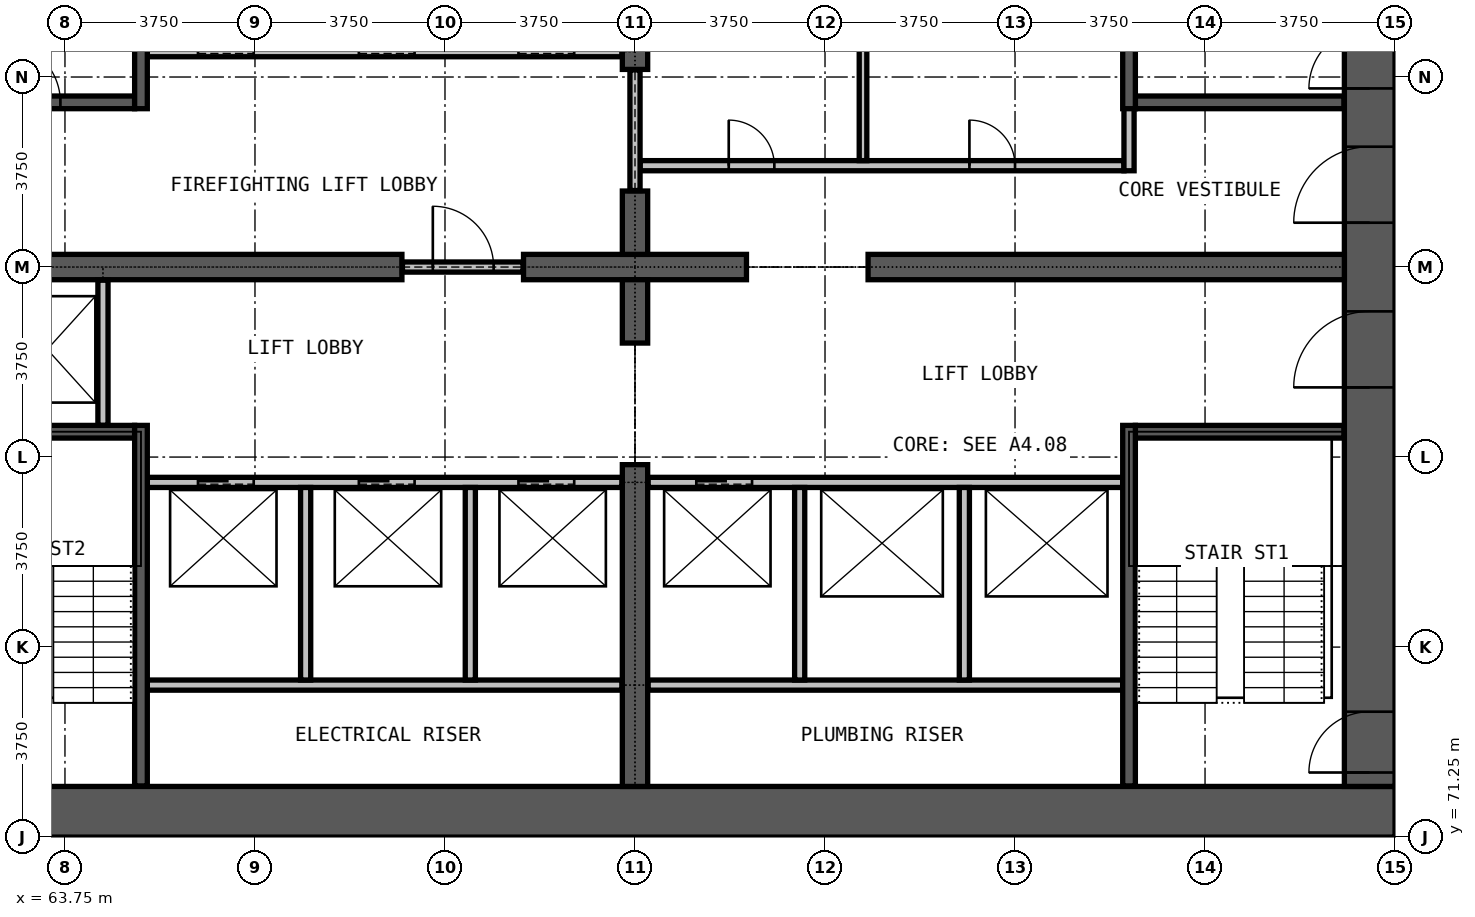
"""IFC4 building model, lengths in metres.
Left out: names, types, materials, properties, quantities, classifications, styles, units other than length and angle.
Written with IfcOpenShell. Run it as: python <this file> out.ifc"""

import sys

from ifc_helpers import new_model, si_unit, direction, frame, frame_2d, origin, place, context, subcontext, project, spatial, rectangle, extrude, element, fill, save


model = new_model("IFC4")
c1 = context("Model", 3, precision=1e-05, world=origin(), true_north=direction((0.0, 1.0)))
c2 = subcontext(c1, "Body", "Model", "MODEL_VIEW")
j1 = project(units=[si_unit("LENGTHUNIT", "METRE"), si_unit("PLANEANGLEUNIT", "RADIAN")], contexts=[c1])
p1 = place(None, origin())
s1 = spatial("IfcSite", under=j1, at=p1, CompositionType="ELEMENT")
p2 = place(p1, origin())
s2 = spatial("IfcBuilding", under=s1, at=p2, CompositionType="ELEMENT")
p3 = place(p2, frame((0.0, 0.0, 46.1)))
s3 = spatial("IfcBuildingStorey", under=s2, at=p3, CompositionType="ELEMENT", Elevation=46.1)
p4 = place(p3, frame((60.0, 71.75, 0.0), z_axis=(0.0, 0.0, 1.0), x_axis=(1.0, 0.0, 0.0)))
e1 = element("IfcWall", 1, at=p4, inside=s3, PredefinedType="SHEAR", context=c2, shape_type="SweptSolid", body=[
    extrude(rectangle(XDim=30.0, YDim=1.0, at=frame_2d((15.0, 0.0))), origin(), (0.0, 0.0, 1.0), 3.3),
])
p5 = place(p3, frame((89.5, 72.25, 0.0), z_axis=(0.0, 0.0, 1.0), x_axis=(0.0, 1.0, 0.0)))
e2 = element("IfcWall", 2, at=p5, inside=s3, PredefinedType="SHEAR", context=c2, shape_type="SweptSolid", body=[
    extrude(rectangle(XDim=20.5, YDim=1.0, at=frame_2d((10.25, 0.0))), origin(), (0.0, 0.0, 1.0), 3.3),
])
p6 = place(p5, frame((0.275, 0.0, 0.0)))
e3 = element("IfcOpeningElement", 3, at=p6, cuts=e2, PredefinedType="OPENING", context=c2, shape_type="SweptSolid", body=[
    extrude(rectangle(XDim=1.2, YDim=2.2, at=frame_2d((0.6, 1.1))), frame((0.0, 0.51, 0.0), z_axis=(0.0, -1.0, 0.0), x_axis=(1.0, 0.0, 0.0)), (0.0, 0.0, 1.0), 1.02),
])
p7 = place(p5, frame((13.775, 0.0, 0.0)))
e4 = element("IfcOpeningElement", 4, at=p7, cuts=e2, PredefinedType="OPENING", context=c2, shape_type="SweptSolid", body=[
    extrude(rectangle(XDim=1.2, YDim=2.2, at=frame_2d((0.6, 1.1))), frame((0.0, 0.51, 0.0), z_axis=(0.0, -1.0, 0.0), x_axis=(1.0, 0.0, 0.0)), (0.0, 0.0, 1.0), 1.02),
])
p8 = place(p5, frame((7.875, 0.0, 0.0)))
e5 = element("IfcOpeningElement", 5, at=p8, cuts=e2, PredefinedType="OPENING", context=c2, shape_type="SweptSolid", body=[
    extrude(rectangle(XDim=1.5, YDim=2.2, at=frame_2d((0.75, 1.1))), frame((0.0, 0.51, 0.0), z_axis=(0.0, -1.0, 0.0), x_axis=(1.0, 0.0, 0.0)), (0.0, 0.0, 1.0), 1.02),
])
p9 = place(p5, frame((11.125, 0.0, 0.0)))
e6 = element("IfcOpeningElement", 6, at=p9, cuts=e2, PredefinedType="OPENING", context=c2, shape_type="SweptSolid", body=[
    extrude(rectangle(XDim=1.5, YDim=2.2, at=frame_2d((0.75, 1.1))), frame((0.0, 0.51, 0.0), z_axis=(0.0, -1.0, 0.0), x_axis=(1.0, 0.0, 0.0)), (0.0, 0.0, 1.0), 1.02),
])
p10 = place(p3, frame((61.0, 82.5, 0.0), z_axis=(0.0, 0.0, 1.0), x_axis=(1.0, 0.0, 0.0)))
e7 = element("IfcWall", 7, at=p10, inside=s3, PredefinedType="SHEAR", context=c2, shape_type="SweptSolid", body=[
    extrude(rectangle(XDim=9.4, YDim=0.5, at=frame_2d((4.7, 0.0))), origin(), (0.0, 0.0, 1.0), 3.3),
])
p11 = place(p3, frame((72.8, 82.5, 0.0), z_axis=(0.0, 0.0, 1.0), x_axis=(1.0, 0.0, 0.0)))
e8 = element("IfcWall", 8, at=p11, inside=s3, PredefinedType="SHEAR", context=c2, shape_type="SweptSolid", body=[
    extrude(rectangle(XDim=4.4, YDim=0.5, at=frame_2d((2.2, 0.0))), origin(), (0.0, 0.0, 1.0), 3.3),
])
p12 = place(p3, frame((79.6, 82.5, 0.0), z_axis=(0.0, 0.0, 1.0), x_axis=(1.0, 0.0, 0.0)))
e9 = element("IfcWall", 9, at=p12, inside=s3, PredefinedType="SHEAR", context=c2, shape_type="SweptSolid", body=[
    extrude(rectangle(XDim=9.4, YDim=0.5, at=frame_2d((4.7, 0.0))), origin(), (0.0, 0.0, 1.0), 3.3),
])
p13 = place(p3, frame((75.0, 72.25, 0.0), z_axis=(0.0, 0.0, 1.0), x_axis=(0.0, 1.0, 0.0)))
e10 = element("IfcWall", 10, at=p13, inside=s3, PredefinedType="SHEAR", context=c2, shape_type="SweptSolid", body=[
    extrude(rectangle(XDim=6.35, YDim=0.5, at=frame_2d((3.175, 0.0))), origin(), (0.0, 0.0, 1.0), 3.3),
])
for number, where, z_axis, x_axis in (
    (11, (75.0, 81.0, 0.0), (0.0, 0.0, 1.0), (0.0, 1.0, 0.0)),
    (12, (75.0, 82.75, 0.0), (0.0, 0.0, 1.0), (0.0, 1.0, 0.0)),
):
    element("IfcWall", number, at=place(p3, frame(where, z_axis=z_axis, x_axis=x_axis)), inside=s3, PredefinedType="SHEAR", context=c2, shape_type="SweptSolid", body=[
        extrude(rectangle(XDim=1.25, YDim=0.5, at=frame_2d((0.625, 0.0))), origin(), (0.0, 0.0, 1.0), 3.3),
    ])
p14 = place(p3, frame((75.0, 86.4, 0.0), z_axis=(0.0, 0.0, 1.0), x_axis=(0.0, 1.0, 0.0)))
e13 = element("IfcWall", 13, at=p14, inside=s3, PredefinedType="SHEAR", context=c2, shape_type="SweptSolid", body=[
    extrude(rectangle(XDim=6.35, YDim=0.5, at=frame_2d((3.175, 0.0))), origin(), (0.0, 0.0, 1.0), 3.3),
])
p15 = place(p3, frame((70.41, 82.5, 0.0), z_axis=(0.0, 0.0, 1.0), x_axis=(1.0, 0.0, 0.0)))
e14 = element("IfcWall", 14, at=p15, inside=s3, PredefinedType="PARTITIONING", context=c2, shape_type="SweptSolid", body=[
    extrude(rectangle(XDim=2.38, YDim=0.2, at=frame_2d((1.19, 0.0))), origin(), (0.0, 0.0, 1.0), 2.4),
])
p16 = place(p15, frame((0.6, 0.0, 0.0)))
e15 = element("IfcOpeningElement", 15, at=p16, cuts=e14, PredefinedType="OPENING", context=c2, shape_type="SweptSolid", body=[
    extrude(rectangle(XDim=1.2, YDim=2.2, at=frame_2d((0.6, 1.1))), frame((0.0, 0.11, 0.0), z_axis=(0.0, -1.0, 0.0), x_axis=(1.0, 0.0, 0.0)), (0.0, 0.0, 1.0), 0.22),
])
p17 = place(p3, frame((75.1, 84.5, 0.0), z_axis=(0.0, 0.0, 1.0), x_axis=(1.0, 0.0, 0.0)))
e16 = element("IfcWall", 16, at=p17, inside=s3, PredefinedType="PARTITIONING", context=c2, shape_type="SweptSolid", body=[
    extrude(rectangle(XDim=9.55, YDim=0.2, at=frame_2d((4.775, 0.0))), origin(), (0.0, 0.0, 1.0), 3.0),
])
p18 = place(p17, frame((1.75, 0.0, 0.0)))
e17 = element("IfcOpeningElement", 17, at=p18, cuts=e16, PredefinedType="OPENING", context=c2, shape_type="SweptSolid", body=[
    extrude(rectangle(XDim=0.9, YDim=2.2, at=frame_2d((0.45, 1.1))), frame((0.0, 0.11, 0.0), z_axis=(0.0, -1.0, 0.0), x_axis=(1.0, 0.0, 0.0)), (0.0, 0.0, 1.0), 0.22),
])
p19 = place(p17, frame((6.5, 0.0, 0.0)))
e18 = element("IfcOpeningElement", 18, at=p19, cuts=e16, PredefinedType="OPENING", context=c2, shape_type="SweptSolid", body=[
    extrude(rectangle(XDim=0.9, YDim=2.2, at=frame_2d((0.45, 1.1))), frame((0.0, 0.11, 0.0), z_axis=(0.0, -1.0, 0.0), x_axis=(1.0, 0.0, 0.0)), (0.0, 0.0, 1.0), 0.22),
])
p20 = place(p3, frame((75.0, 84.01, 0.0), z_axis=(0.0, 0.0, 1.0), x_axis=(0.0, 1.0, 0.0)))
e19 = element("IfcWall", 19, at=p20, inside=s3, PredefinedType="PARTITIONING", context=c2, shape_type="SweptSolid", body=[
    extrude(rectangle(XDim=2.38, YDim=0.2, at=frame_2d((1.19, 0.0))), origin(), (0.0, 0.0, 1.0), 2.4),
])
p21 = place(p3, frame((84.75, 84.4, 0.0), z_axis=(0.0, 0.0, 1.0), x_axis=(0.0, 1.0, 0.0)))
e20 = element("IfcWall", 20, at=p21, inside=s3, PredefinedType="PARTITIONING", context=c2, shape_type="SweptSolid", body=[
    extrude(rectangle(XDim=1.475, YDim=0.2, at=frame_2d((0.738, 0.0))), origin(), (0.0, 0.0, 1.0), 3.0),
])
p22 = place(p3, frame((79.5, 84.6, 0.0), z_axis=(0.0, 0.0, 1.0), x_axis=(0.0, 1.0, 0.0)))
e21 = element("IfcWall", 21, at=p22, inside=s3, PredefinedType="PARTITIONING", context=c2, shape_type="SweptSolid", body=[
    extrude(rectangle(XDim=6.05, YDim=0.15, at=frame_2d((3.025, 0.0))), origin(), (0.0, 0.0, 1.0), 3.0),
])
for number, where, z_axis, x_axis in (
    (22, (65.375, 74.25, 0.0), (0.0, 0.0, 1.0), (1.0, 0.0, 0.0)),
    (23, (75.26, 74.25, 0.0), (0.0, 0.0, 1.0), (1.0, 0.0, 0.0)),
):
    element("IfcWall", number, at=place(p3, frame(where, z_axis=z_axis, x_axis=x_axis)), inside=s3, PredefinedType="PARTITIONING", context=c2, shape_type="SweptSolid", body=[
        extrude(rectangle(XDim=9.365, YDim=0.2, at=frame_2d((4.683, 0.0))), origin(), (0.0, 0.0, 1.0), 3.0),
    ])
p23 = place(p3, frame((65.375, 78.25, 0.0), z_axis=(0.0, 0.0, 1.0), x_axis=(1.0, 0.0, 0.0)))
e24 = element("IfcWall", 24, at=p23, inside=s3, PredefinedType="PARTITIONING", context=c2, shape_type="SweptSolid", body=[
    extrude(rectangle(XDim=9.365, YDim=0.2, at=frame_2d((4.683, 0.0))), origin(), (0.0, 0.0, 1.0), 3.0),
])
p24 = place(p23, frame((1.0, 0.0, 0.0)))
e25 = element("IfcOpeningElement", 25, at=p24, cuts=e24, PredefinedType="OPENING", context=c2, shape_type="SweptSolid", body=[
    extrude(rectangle(XDim=1.1, YDim=2.2, at=frame_2d((0.55, 1.1))), frame((0.0, 0.11, 0.0), z_axis=(0.0, -1.0, 0.0), x_axis=(1.0, 0.0, 0.0)), (0.0, 0.0, 1.0), 0.22),
])
p25 = place(p23, frame((4.175, 0.0, 0.0)))
e26 = element("IfcOpeningElement", 26, at=p25, cuts=e24, PredefinedType="OPENING", context=c2, shape_type="SweptSolid", body=[
    extrude(rectangle(XDim=1.1, YDim=2.2, at=frame_2d((0.55, 1.1))), frame((0.0, 0.11, 0.0), z_axis=(0.0, -1.0, 0.0), x_axis=(1.0, 0.0, 0.0)), (0.0, 0.0, 1.0), 0.22),
])
p26 = place(p23, frame((7.325, 0.0, 0.0)))
e27 = element("IfcOpeningElement", 27, at=p26, cuts=e24, PredefinedType="OPENING", context=c2, shape_type="SweptSolid", body=[
    extrude(rectangle(XDim=1.1, YDim=2.2, at=frame_2d((0.55, 1.1))), frame((0.0, 0.11, 0.0), z_axis=(0.0, -1.0, 0.0), x_axis=(1.0, 0.0, 0.0)), (0.0, 0.0, 1.0), 0.22),
])
p27 = place(p3, frame((75.26, 78.25, 0.0), z_axis=(0.0, 0.0, 1.0), x_axis=(1.0, 0.0, 0.0)))
e28 = element("IfcWall", 28, at=p27, inside=s3, PredefinedType="PARTITIONING", context=c2, shape_type="SweptSolid", body=[
    extrude(rectangle(XDim=9.365, YDim=0.2, at=frame_2d((4.683, 0.0))), origin(), (0.0, 0.0, 1.0), 3.0),
])
p28 = place(p27, frame((0.95, 0.0, 0.0)))
e29 = element("IfcOpeningElement", 29, at=p28, cuts=e28, PredefinedType="OPENING", context=c2, shape_type="SweptSolid", body=[
    extrude(rectangle(XDim=1.1, YDim=2.2, at=frame_2d((0.55, 1.1))), frame((0.0, 0.11, 0.0), z_axis=(0.0, -1.0, 0.0), x_axis=(1.0, 0.0, 0.0)), (0.0, 0.0, 1.0), 0.22),
])
p29 = place(p3, frame((65.375, 86.75, 0.0), z_axis=(0.0, 0.0, 1.0), x_axis=(1.0, 0.0, 0.0)))
e30 = element("IfcWall", 30, at=p29, inside=s3, PredefinedType="PARTITIONING", context=c2, shape_type="SweptSolid", body=[
    extrude(rectangle(XDim=9.365, YDim=0.2, at=frame_2d((4.683, 0.0))), origin(), (0.0, 0.0, 1.0), 3.0),
])
p30 = place(p29, frame((1.0, 0.0, 0.0)))
e31 = element("IfcOpeningElement", 31, at=p30, cuts=e30, PredefinedType="OPENING", context=c2, shape_type="SweptSolid", body=[
    extrude(rectangle(XDim=1.1, YDim=2.2, at=frame_2d((0.55, 1.1))), frame((0.0, 0.11, 0.0), z_axis=(0.0, -1.0, 0.0), x_axis=(1.0, 0.0, 0.0)), (0.0, 0.0, 1.0), 0.22),
])
p31 = place(p29, frame((4.175, 0.0, 0.0)))
e32 = element("IfcOpeningElement", 32, at=p31, cuts=e30, PredefinedType="OPENING", context=c2, shape_type="SweptSolid", body=[
    extrude(rectangle(XDim=1.1, YDim=2.2, at=frame_2d((0.55, 1.1))), frame((0.0, 0.11, 0.0), z_axis=(0.0, -1.0, 0.0), x_axis=(1.0, 0.0, 0.0)), (0.0, 0.0, 1.0), 0.22),
])
p32 = place(p29, frame((7.325, 0.0, 0.0)))
e33 = element("IfcOpeningElement", 33, at=p32, cuts=e30, PredefinedType="OPENING", context=c2, shape_type="SweptSolid", body=[
    extrude(rectangle(XDim=1.1, YDim=2.2, at=frame_2d((0.55, 1.1))), frame((0.0, 0.11, 0.0), z_axis=(0.0, -1.0, 0.0), x_axis=(1.0, 0.0, 0.0)), (0.0, 0.0, 1.0), 0.22),
])
p33 = place(p3, frame((64.5, 79.375, 0.0), z_axis=(0.0, 0.0, 1.0), x_axis=(0.0, 1.0, 0.0)))
e34 = element("IfcWall", 34, at=p33, inside=s3, PredefinedType="PARTITIONING", context=c2, shape_type="SweptSolid", body=[
    extrude(rectangle(XDim=2.865, YDim=0.2, at=frame_2d((1.433, 0.0))), origin(), (0.0, 0.0, 1.0), 3.0),
])
for number, where, z_axis, x_axis in (
    (35, (68.5, 74.35, 0.0), (0.0, 0.0, 1.0), (0.0, 1.0, 0.0)),
    (36, (71.75, 74.35, 0.0), (0.0, 0.0, 1.0), (0.0, 1.0, 0.0)),
    (37, (78.25, 74.35, 0.0), (0.0, 0.0, 1.0), (0.0, 1.0, 0.0)),
    (38, (81.5, 74.35, 0.0), (0.0, 0.0, 1.0), (0.0, 1.0, 0.0)),
):
    element("IfcWall", number, at=place(p3, frame(where, z_axis=z_axis, x_axis=x_axis)), inside=s3, PredefinedType="PARTITIONING", context=c2, shape_type="SweptSolid", body=[
        extrude(rectangle(XDim=3.8, YDim=0.2, at=frame_2d((1.9, 0.0))), origin(), (0.0, 0.0, 1.0), 3.0),
    ])
for number, where, z_axis, x_axis in (
    (39, (61.01, 79.25, 0.0), (0.0, 0.0, 1.0), (1.0, 0.0, 0.0)),
    (40, (84.875, 79.25, 0.0), (0.0, 0.0, 1.0), (1.0, 0.0, 0.0)),
):
    element("IfcWall", number, at=place(p3, frame(where, z_axis=z_axis, x_axis=x_axis)), inside=s3, PredefinedType="PARTITIONING", context=c2, shape_type="SweptSolid", body=[
        extrude(rectangle(XDim=4.115, YDim=0.25, at=frame_2d((2.058, 0.0))), origin(), (0.0, 0.0, 1.0), 3.0),
    ])
p34 = place(p3, frame((61.01, 85.75, 0.0), z_axis=(0.0, 0.0, 1.0), x_axis=(1.0, 0.0, 0.0)))
e41 = element("IfcWall", 41, at=p34, inside=s3, PredefinedType="PARTITIONING", context=c2, shape_type="SweptSolid", body=[
    extrude(rectangle(XDim=4.115, YDim=0.25, at=frame_2d((2.058, 0.0))), origin(), (0.0, 0.0, 1.0), 3.0),
])
p35 = place(p34, frame((1.45, 0.0, 0.0)))
e42 = element("IfcOpeningElement", 42, at=p35, cuts=e41, PredefinedType="OPENING", context=c2, shape_type="SweptSolid", body=[
    extrude(rectangle(XDim=1.2, YDim=2.2, at=frame_2d((0.6, 1.1))), frame((0.0, 0.135, 0.0), z_axis=(0.0, -1.0, 0.0), x_axis=(1.0, 0.0, 0.0)), (0.0, 0.0, 1.0), 0.27),
])
p36 = place(p3, frame((84.875, 85.75, 0.0), z_axis=(0.0, 0.0, 1.0), x_axis=(1.0, 0.0, 0.0)))
e43 = element("IfcWall", 43, at=p36, inside=s3, PredefinedType="PARTITIONING", context=c2, shape_type="SweptSolid", body=[
    extrude(rectangle(XDim=4.115, YDim=0.25, at=frame_2d((2.058, 0.0))), origin(), (0.0, 0.0, 1.0), 3.0),
])
for number, where, z_axis, x_axis in (
    (44, (65.25, 72.26, 0.0), (0.0, 0.0, 1.0), (0.0, 1.0, 0.0)),
    (45, (65.25, 85.625, 0.0), (0.0, 0.0, 1.0), (0.0, 1.0, 0.0)),
    (46, (84.75, 72.26, 0.0), (0.0, 0.0, 1.0), (0.0, 1.0, 0.0)),
    (47, (84.75, 85.625, 0.0), (0.0, 0.0, 1.0), (0.0, 1.0, 0.0)),
):
    element("IfcWall", number, at=place(p3, frame(where, z_axis=z_axis, x_axis=x_axis)), inside=s3, PredefinedType="PARTITIONING", context=c2, shape_type="SweptSolid", body=[
        extrude(rectangle(XDim=7.115, YDim=0.25, at=frame_2d((3.558, 0.0))), origin(), (0.0, 0.0, 1.0), 3.0),
    ])
p37 = place(p24, origin())
e48 = element("IfcDoor", 48, at=p37, inside=s3, OperationType="DOUBLE_DOOR_SLIDING", PredefinedType="DOOR", context=c2, shape_type="SweptSolid", body=[
    extrude(rectangle(XDim=1.1, YDim=2.2, at=frame_2d((0.55, 1.1))), frame((0.0, 0.025, 0.0), z_axis=(0.0, -1.0, 0.0), x_axis=(1.0, 0.0, 0.0)), (0.0, 0.0, 1.0), 0.05),
])
fill(e25, e48)
p38 = place(p25, origin())
e49 = element("IfcDoor", 49, at=p38, inside=s3, OperationType="DOUBLE_DOOR_SLIDING", PredefinedType="DOOR", context=c2, shape_type="SweptSolid", body=[
    extrude(rectangle(XDim=1.1, YDim=2.2, at=frame_2d((0.55, 1.1))), frame((0.0, 0.025, 0.0), z_axis=(0.0, -1.0, 0.0), x_axis=(1.0, 0.0, 0.0)), (0.0, 0.0, 1.0), 0.05),
])
fill(e26, e49)
p39 = place(p26, origin())
e50 = element("IfcDoor", 50, at=p39, inside=s3, OperationType="DOUBLE_DOOR_SLIDING", PredefinedType="DOOR", context=c2, shape_type="SweptSolid", body=[
    extrude(rectangle(XDim=1.1, YDim=2.2, at=frame_2d((0.55, 1.1))), frame((0.0, 0.025, 0.0), z_axis=(0.0, -1.0, 0.0), x_axis=(1.0, 0.0, 0.0)), (0.0, 0.0, 1.0), 0.05),
])
fill(e27, e50)
p40 = place(p28, origin())
e51 = element("IfcDoor", 51, at=p40, inside=s3, OperationType="DOUBLE_DOOR_SLIDING", PredefinedType="DOOR", context=c2, shape_type="SweptSolid", body=[
    extrude(rectangle(XDim=1.1, YDim=2.2, at=frame_2d((0.55, 1.1))), frame((0.0, 0.025, 0.0), z_axis=(0.0, -1.0, 0.0), x_axis=(1.0, 0.0, 0.0)), (0.0, 0.0, 1.0), 0.05),
])
fill(e29, e51)
p41 = place(p30, origin())
e52 = element("IfcDoor", 52, at=p41, inside=s3, OperationType="DOUBLE_DOOR_SLIDING", PredefinedType="DOOR", context=c2, shape_type="SweptSolid", body=[
    extrude(rectangle(XDim=1.1, YDim=2.2, at=frame_2d((0.55, 1.1))), frame((0.0, 0.025, 0.0), z_axis=(0.0, -1.0, 0.0), x_axis=(1.0, 0.0, 0.0)), (0.0, 0.0, 1.0), 0.05),
])
fill(e31, e52)
p42 = place(p31, origin())
e53 = element("IfcDoor", 53, at=p42, inside=s3, OperationType="DOUBLE_DOOR_SLIDING", PredefinedType="DOOR", context=c2, shape_type="SweptSolid", body=[
    extrude(rectangle(XDim=1.1, YDim=2.2, at=frame_2d((0.55, 1.1))), frame((0.0, 0.025, 0.0), z_axis=(0.0, -1.0, 0.0), x_axis=(1.0, 0.0, 0.0)), (0.0, 0.0, 1.0), 0.05),
])
fill(e32, e53)
p43 = place(p32, origin())
e54 = element("IfcDoor", 54, at=p43, inside=s3, OperationType="DOUBLE_DOOR_SLIDING", PredefinedType="DOOR", context=c2, shape_type="SweptSolid", body=[
    extrude(rectangle(XDim=1.1, YDim=2.2, at=frame_2d((0.55, 1.1))), frame((0.0, 0.025, 0.0), z_axis=(0.0, -1.0, 0.0), x_axis=(1.0, 0.0, 0.0)), (0.0, 0.0, 1.0), 0.05),
])
fill(e33, e54)
p44 = place(p16, origin())
e55 = element("IfcDoor", 55, at=p44, inside=s3, OperationType="SINGLE_SWING_LEFT", PredefinedType="DOOR", context=c2, shape_type="SweptSolid", body=[
    extrude(rectangle(XDim=1.2, YDim=2.2, at=frame_2d((0.6, 1.1))), frame((0.0, 0.025, 0.0), z_axis=(0.0, -1.0, 0.0), x_axis=(1.0, 0.0, 0.0)), (0.0, 0.0, 1.0), 0.05),
])
fill(e15, e55)
p45 = place(p35, origin())
e56 = element("IfcDoor", 56, at=p45, inside=s3, OperationType="SINGLE_SWING_LEFT", PredefinedType="DOOR", context=c2, shape_type="SweptSolid", body=[
    extrude(rectangle(XDim=1.2, YDim=2.2, at=frame_2d((0.6, 1.1))), frame((0.0, 0.025, 0.0), z_axis=(0.0, -1.0, 0.0), x_axis=(1.0, 0.0, 0.0)), (0.0, 0.0, 1.0), 0.05),
])
fill(e42, e56)
p46 = place(p6, origin())
e57 = element("IfcDoor", 57, at=p46, inside=s3, OperationType="SINGLE_SWING_RIGHT", PredefinedType="DOOR", context=c2, shape_type="SweptSolid", body=[
    extrude(rectangle(XDim=1.2, YDim=2.2, at=frame_2d((0.6, 1.1))), frame((0.0, 0.025, 0.0), z_axis=(0.0, -1.0, 0.0), x_axis=(1.0, 0.0, 0.0)), (0.0, 0.0, 1.0), 0.05),
])
fill(e3, e57)
p47 = place(p7, origin())
e58 = element("IfcDoor", 58, at=p47, inside=s3, OperationType="SINGLE_SWING_LEFT", PredefinedType="DOOR", context=c2, shape_type="SweptSolid", body=[
    extrude(rectangle(XDim=1.2, YDim=2.2, at=frame_2d((0.6, 1.1))), frame((0.0, 0.025, 0.0), z_axis=(0.0, -1.0, 0.0), x_axis=(1.0, 0.0, 0.0)), (0.0, 0.0, 1.0), 0.05),
])
fill(e4, e58)
p48 = place(p8, origin())
e59 = element("IfcDoor", 59, at=p48, inside=s3, OperationType="DOUBLE_DOOR_SINGLE_SWING", PredefinedType="DOOR", context=c2, shape_type="SweptSolid", body=[
    extrude(rectangle(XDim=1.5, YDim=2.2, at=frame_2d((0.75, 1.1))), frame((0.0, 0.025, 0.0), z_axis=(0.0, -1.0, 0.0), x_axis=(1.0, 0.0, 0.0)), (0.0, 0.0, 1.0), 0.05),
])
fill(e5, e59)
p49 = place(p9, origin())
e60 = element("IfcDoor", 60, at=p49, inside=s3, OperationType="DOUBLE_DOOR_SINGLE_SWING", PredefinedType="DOOR", context=c2, shape_type="SweptSolid", body=[
    extrude(rectangle(XDim=1.5, YDim=2.2, at=frame_2d((0.75, 1.1))), frame((0.0, 0.025, 0.0), z_axis=(0.0, -1.0, 0.0), x_axis=(1.0, 0.0, 0.0)), (0.0, 0.0, 1.0), 0.05),
])
fill(e6, e60)
p50 = place(p18, origin())
e61 = element("IfcDoor", 61, at=p50, inside=s3, OperationType="SINGLE_SWING_LEFT", PredefinedType="DOOR", context=c2, shape_type="SweptSolid", body=[
    extrude(rectangle(XDim=0.9, YDim=2.2, at=frame_2d((0.45, 1.1))), frame((0.0, 0.025, 0.0), z_axis=(0.0, -1.0, 0.0), x_axis=(1.0, 0.0, 0.0)), (0.0, 0.0, 1.0), 0.05),
])
fill(e17, e61)
p51 = place(p19, origin())
e62 = element("IfcDoor", 62, at=p51, inside=s3, OperationType="SINGLE_SWING_RIGHT", PredefinedType="DOOR", context=c2, shape_type="SweptSolid", body=[
    extrude(rectangle(XDim=0.9, YDim=2.2, at=frame_2d((0.45, 1.1))), frame((0.0, 0.025, 0.0), z_axis=(0.0, -1.0, 0.0), x_axis=(1.0, 0.0, 0.0)), (0.0, 0.0, 1.0), 0.05),
])
fill(e18, e62)
save(model, sys.argv[1])
